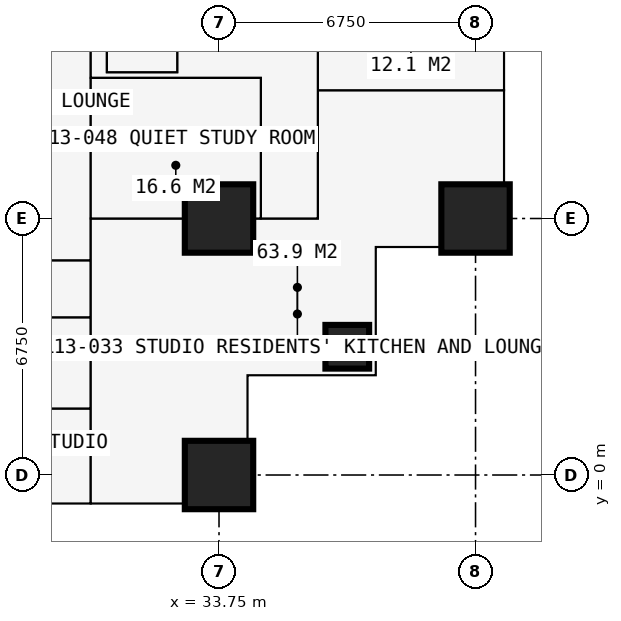
"""IFC4 building model, lengths in metres.
Left out: names, types, materials, properties, quantities, classifications, styles, units other than length and angle.
Written with IfcOpenShell. Run it as: python <this file> out.ifc"""

import sys

from ifc_helpers import new_model, si_unit, direction, frame, frame_2d, origin, origin_2d, place, context, subcontext, project, spatial, rectangle, extrude, element, fill, save


model = new_model("IFC4")
c1 = context("Model", 3, precision=1e-05, world=origin(), true_north=direction((0.0, 1.0)))
c2 = subcontext(c1, "Body", "Model", "MODEL_VIEW")
j1 = project(units=[si_unit("LENGTHUNIT", "METRE"), si_unit("PLANEANGLEUNIT", "RADIAN")], contexts=[c1])
p1 = place(None, origin())
s1 = spatial("IfcSite", under=j1, at=p1, CompositionType="ELEMENT")
p2 = place(p1, origin())
s2 = spatial("IfcBuilding", under=s1, at=p2, CompositionType="ELEMENT")
p3 = place(p2, frame((0.0, 0.0, 50.4)))
s3 = spatial("IfcBuildingStorey", under=s2, at=p3, CompositionType="ELEMENT", Elevation=50.4)
for number, where, z_axis, x_axis in (
    (1, (33.75, 0.0, 0.0), (0.0, 0.0, 1.0), (1.0, 0.0, 0.0)),
    (2, (33.75, 6.75, 0.0), (0.0, 0.0, 1.0), (1.0, 0.0, 0.0)),
):
    element("IfcColumn", number, at=place(p3, frame(where, z_axis=z_axis, x_axis=x_axis)), inside=s3, PredefinedType="COLUMN", context=c2, shape_type="SweptSolid", body=[
        extrude(rectangle(XDim=1.8, YDim=1.8, at=origin_2d()), origin(), (0.0, 0.0, 1.0), 3.6),
    ])
p4 = place(p3, frame((37.125, 3.375, 0.0), z_axis=(0.0, 0.0, 1.0), x_axis=(1.0, 0.0, 0.0)))
e3 = element("IfcColumn", 3, at=p4, inside=s3, PredefinedType="COLUMN", context=c2, shape_type="SweptSolid", body=[
    extrude(rectangle(XDim=1.15, YDim=1.15, at=origin_2d()), origin(), (0.0, 0.0, 1.0), 3.6),
])
p5 = place(p3, frame((40.5, 6.75, 0.0), z_axis=(0.0, 0.0, 1.0), x_axis=(1.0, 0.0, 0.0)))
e4 = element("IfcColumn", 4, at=p5, inside=s3, PredefinedType="COLUMN", context=c2, shape_type="SweptSolid", body=[
    extrude(rectangle(XDim=1.8, YDim=1.8, at=origin_2d()), origin(), (0.0, 0.0, 1.0), 3.6),
])
p6 = place(p3, frame((34.5, -0.75, 0.0), z_axis=(0.0, 0.0, 1.0), x_axis=(0.0, 1.0, 0.0)))
e5 = element("IfcWall", 5, at=p6, inside=s3, PredefinedType="SOLIDWALL", context=c2, shape_type="SweptSolid", body=[
    extrude(rectangle(XDim=3.375, YDim=0.3, at=frame_2d((1.688, 0.0))), origin(), (0.0, 0.0, 1.0), 3.375),
])
p7 = place(p6, frame((1.833, 0.0, 0.9)))
e6 = element("IfcOpeningElement", 6, at=p7, cuts=e5, PredefinedType="OPENING", context=c2, shape_type="SweptSolid", body=[
    extrude(rectangle(XDim=1.2, YDim=1.8, at=frame_2d((0.6, 0.9))), frame((0.0, 0.16, 0.0), z_axis=(0.0, -1.0, 0.0), x_axis=(1.0, 0.0, 0.0)), (0.0, 0.0, 1.0), 0.32),
])
p8 = place(p3, frame((34.5, 2.625, 0.0), z_axis=(0.0, 0.0, 1.0), x_axis=(1.0, 0.0, 0.0)))
e7 = element("IfcWall", 7, at=p8, inside=s3, PredefinedType="SOLIDWALL", context=c2, shape_type="SweptSolid", body=[
    extrude(rectangle(XDim=3.375, YDim=0.3, at=frame_2d((1.688, 0.0))), origin(), (0.0, 0.0, 1.0), 3.375),
])
p9 = place(p8, frame((0.788, 0.0, 0.6)))
e8 = element("IfcOpeningElement", 8, at=p9, cuts=e7, PredefinedType="OPENING", context=c2, shape_type="SweptSolid", body=[
    extrude(rectangle(XDim=1.8, YDim=2.1, at=frame_2d((0.9, 1.05))), frame((0.0, 0.16, 0.0), z_axis=(0.0, -1.0, 0.0), x_axis=(1.0, 0.0, 0.0)), (0.0, 0.0, 1.0), 0.32),
])
p10 = place(p3, frame((37.875, 2.625, 0.0), z_axis=(0.0, 0.0, 1.0), x_axis=(0.0, 1.0, 0.0)))
e9 = element("IfcWall", 9, at=p10, inside=s3, PredefinedType="SOLIDWALL", context=c2, shape_type="SweptSolid", body=[
    extrude(rectangle(XDim=3.375, YDim=0.3, at=frame_2d((1.688, 0.0))), origin(), (0.0, 0.0, 1.0), 3.375),
])
p11 = place(p10, frame((0.788, 0.0, 0.6)))
e10 = element("IfcOpeningElement", 10, at=p11, cuts=e9, PredefinedType="OPENING", context=c2, shape_type="SweptSolid", body=[
    extrude(rectangle(XDim=1.8, YDim=2.1, at=frame_2d((0.9, 1.05))), frame((0.0, 0.16, 0.0), z_axis=(0.0, -1.0, 0.0), x_axis=(1.0, 0.0, 0.0)), (0.0, 0.0, 1.0), 0.32),
])
p12 = place(p3, frame((37.875, 6.0, 0.0), z_axis=(0.0, 0.0, 1.0), x_axis=(1.0, 0.0, 0.0)))
e11 = element("IfcWall", 11, at=p12, inside=s3, PredefinedType="SOLIDWALL", context=c2, shape_type="SweptSolid", body=[
    extrude(rectangle(XDim=3.375, YDim=0.3, at=frame_2d((1.688, 0.0))), origin(), (0.0, 0.0, 1.0), 3.375),
])
p13 = place(p12, frame((0.343, 0.0, 0.9)))
e12 = element("IfcOpeningElement", 12, at=p13, cuts=e11, PredefinedType="OPENING", context=c2, shape_type="SweptSolid", body=[
    extrude(rectangle(XDim=1.2, YDim=1.8, at=frame_2d((0.6, 0.9))), frame((0.0, 0.16, 0.0), z_axis=(0.0, -1.0, 0.0), x_axis=(1.0, 0.0, 0.0)), (0.0, 0.0, 1.0), 0.32),
])
p14 = place(p3, frame((6.75, 4.15, 0.0), z_axis=(0.0, 0.0, 1.0), x_axis=(1.0, 0.0, 0.0)))
e13 = element("IfcWall", 13, at=p14, inside=s3, PredefinedType="PARTITIONING", context=c2, shape_type="SweptSolid", body=[
    extrude(rectangle(XDim=23.625, YDim=0.15, at=frame_2d((11.812, 0.0))), origin(), (0.0, 0.0, 1.0), 3.375),
])
p15 = place(p14, frame((0.2, 0.0, 0.0)))
e14 = element("IfcOpeningElement", 14, at=p15, cuts=e13, PredefinedType="OPENING", context=c2, shape_type="SweptSolid", body=[
    extrude(rectangle(XDim=0.95, YDim=2.2, at=frame_2d((0.475, 1.1))), frame((0.0, 0.085, 0.0), z_axis=(0.0, -1.0, 0.0), x_axis=(1.0, 0.0, 0.0)), (0.0, 0.0, 1.0), 0.17),
])
p16 = place(p14, frame((3.625, 0.0, 0.0)))
e15 = element("IfcOpeningElement", 15, at=p16, cuts=e13, PredefinedType="OPENING", context=c2, shape_type="SweptSolid", body=[
    extrude(rectangle(XDim=0.95, YDim=2.2, at=frame_2d((0.475, 1.1))), frame((0.0, 0.085, 0.0), z_axis=(0.0, -1.0, 0.0), x_axis=(1.0, 0.0, 0.0)), (0.0, 0.0, 1.0), 0.17),
])
p17 = place(p14, frame((18.475, 0.0, 0.0)))
e16 = element("IfcOpeningElement", 16, at=p17, cuts=e13, PredefinedType="OPENING", context=c2, shape_type="SweptSolid", body=[
    extrude(rectangle(XDim=0.95, YDim=2.2, at=frame_2d((0.475, 1.1))), frame((0.0, 0.085, 0.0), z_axis=(0.0, -1.0, 0.0), x_axis=(1.0, 0.0, 0.0)), (0.0, 0.0, 1.0), 0.17),
])
p18 = place(p14, frame((11.725, 0.0, 0.0)))
e17 = element("IfcOpeningElement", 17, at=p18, cuts=e13, PredefinedType="OPENING", context=c2, shape_type="SweptSolid", body=[
    extrude(rectangle(XDim=0.95, YDim=2.2, at=frame_2d((0.475, 1.1))), frame((0.0, 0.085, 0.0), z_axis=(0.0, -1.0, 0.0), x_axis=(1.0, 0.0, 0.0)), (0.0, 0.0, 1.0), 0.17),
])
p19 = place(p14, frame((6.95, 0.0, 0.0)))
e18 = element("IfcOpeningElement", 18, at=p19, cuts=e13, PredefinedType="OPENING", context=c2, shape_type="SweptSolid", body=[
    extrude(rectangle(XDim=0.95, YDim=2.2, at=frame_2d((0.475, 1.1))), frame((0.0, 0.085, 0.0), z_axis=(0.0, -1.0, 0.0), x_axis=(1.0, 0.0, 0.0)), (0.0, 0.0, 1.0), 0.17),
])
p20 = place(p3, frame((22.988, 5.65, 0.0), z_axis=(0.0, 0.0, 1.0), x_axis=(1.0, 0.0, 0.0)))
e19 = element("IfcWall", 19, at=p20, inside=s3, PredefinedType="PARTITIONING", context=c2, shape_type="SweptSolid", body=[
    extrude(rectangle(XDim=7.387, YDim=0.15, at=frame_2d((3.694, 0.0))), origin(), (0.0, 0.0, 1.0), 3.375),
])
p21 = place(p20, frame((2.15, 0.0, 0.0)))
e20 = element("IfcOpeningElement", 20, at=p21, cuts=e19, PredefinedType="OPENING", context=c2, shape_type="SweptSolid", body=[
    extrude(rectangle(XDim=0.95, YDim=2.2, at=frame_2d((0.475, 1.1))), frame((0.0, 0.085, 0.0), z_axis=(0.0, -1.0, 0.0), x_axis=(1.0, 0.0, 0.0)), (0.0, 0.0, 1.0), 0.17),
])
p22 = place(p3, frame((27.775, 1.75, 0.0), z_axis=(0.0, 0.0, 1.0), x_axis=(1.0, 0.0, 0.0)))
e21 = element("IfcWall", 21, at=p22, inside=s3, PredefinedType="PARTITIONING", context=c2, shape_type="SweptSolid", body=[
    extrude(rectangle(XDim=2.6, YDim=0.1, at=frame_2d((1.3, 0.0))), origin(), (0.0, 0.0, 1.0), 3.375),
])
p23 = place(p22, frame((0.85, 0.0, 0.0)))
e22 = element("IfcOpeningElement", 22, at=p23, cuts=e21, PredefinedType="OPENING", context=c2, shape_type="SweptSolid", body=[
    extrude(rectangle(XDim=0.9, YDim=2.2, at=frame_2d((0.45, 1.1))), frame((0.0, 0.06, 0.0), z_axis=(0.0, -1.0, 0.0), x_axis=(1.0, 0.0, 0.0)), (0.0, 0.0, 1.0), 0.12),
])
p24 = place(p3, frame((30.375, -0.734, 0.0), z_axis=(0.0, 0.0, 1.0), x_axis=(0.0, 1.0, 0.0)))
e23 = element("IfcWall", 23, at=p24, inside=s3, PredefinedType="PARTITIONING", context=c2, shape_type="SweptSolid", body=[
    extrude(rectangle(XDim=12.034, YDim=0.15, at=frame_2d((6.017, 0.0))), origin(), (0.0, 0.0, 1.0), 3.375),
])
p25 = place(p24, frame((5.134, 0.0, 0.0)))
e24 = element("IfcOpeningElement", 24, at=p25, cuts=e23, PredefinedType="OPENING", context=c2, shape_type="SweptSolid", body=[
    extrude(rectangle(XDim=1.0, YDim=2.2, at=frame_2d((0.5, 1.1))), frame((0.0, 0.085, 0.0), z_axis=(0.0, -1.0, 0.0), x_axis=(1.0, 0.0, 0.0)), (0.0, 0.0, 1.0), 0.17),
])
p26 = place(p3, frame((30.375, 6.75, 0.0), z_axis=(0.0, 0.0, 1.0), x_axis=(1.0, 0.0, 0.0)))
e25 = element("IfcWall", 25, at=p26, inside=s3, PredefinedType="PARTITIONING", context=c2, shape_type="SweptSolid", body=[
    extrude(rectangle(XDim=5.975, YDim=0.15, at=frame_2d((2.988, 0.0))), origin(), (0.0, 0.0, 1.0), 2.877),
])
p27 = place(p3, frame((30.375, 10.45, 0.0), z_axis=(0.0, 0.0, 1.0), x_axis=(1.0, 0.0, 0.0)))
e26 = element("IfcWall", 26, at=p27, inside=s3, PredefinedType="PARTITIONING", context=c2, shape_type="SweptSolid", body=[
    extrude(rectangle(XDim=4.475, YDim=0.15, at=frame_2d((2.238, 0.0))), origin(), (0.0, 0.0, 1.0), 3.375),
])
p28 = place(p27, frame((2.35, 0.0, 0.0)))
e27 = element("IfcOpeningElement", 27, at=p28, cuts=e26, PredefinedType="OPENING", context=c2, shape_type="SweptSolid", body=[
    extrude(rectangle(XDim=0.95, YDim=2.2, at=frame_2d((0.475, 1.1))), frame((0.0, 0.085, 0.0), z_axis=(0.0, -1.0, 0.0), x_axis=(1.0, 0.0, 0.0)), (0.0, 0.0, 1.0), 0.17),
])
p29 = place(p3, frame((30.8, 10.6, 0.0), z_axis=(0.0, 0.0, 1.0), x_axis=(0.0, 1.0, 0.0)))
e28 = element("IfcWall", 28, at=p29, inside=s3, PredefinedType="PARTITIONING", context=c2, shape_type="SweptSolid", body=[
    extrude(rectangle(XDim=0.7, YDim=0.15, at=frame_2d((0.35, 0.0))), origin(), (0.0, 0.0, 1.0), 3.375),
])
p30 = place(p3, frame((30.8, 10.6, 0.0), z_axis=(0.0, 0.0, 1.0), x_axis=(1.0, 0.0, 0.0)))
e29 = element("IfcWall", 29, at=p30, inside=s3, PredefinedType="PARTITIONING", context=c2, shape_type="SweptSolid", body=[
    extrude(rectangle(XDim=1.85, YDim=0.15, at=frame_2d((0.925, 0.0))), origin(), (0.0, 0.0, 1.0), 3.375),
])
p31 = place(p3, frame((32.65, 10.6, 0.0), z_axis=(0.0, 0.0, 1.0), x_axis=(0.0, 1.0, 0.0)))
e30 = element("IfcWall", 30, at=p31, inside=s3, PredefinedType="SHEAR", context=c2, shape_type="SweptSolid", body=[
    extrude(rectangle(XDim=9.3, YDim=0.1, at=frame_2d((4.65, 0.0))), origin(), (0.0, 0.0, 1.0), 3.375),
])
p32 = place(p31, frame((0.5, 0.0, 0.0)))
e31 = element("IfcOpeningElement", 31, at=p32, cuts=e30, PredefinedType="OPENING", context=c2, shape_type="SweptSolid", body=[
    extrude(rectangle(XDim=1.0, YDim=2.2, at=frame_2d((0.5, 1.1))), frame((0.0, 0.06, 0.0), z_axis=(0.0, -1.0, 0.0), x_axis=(1.0, 0.0, 0.0)), (0.0, 0.0, 1.0), 0.12),
])
p33 = place(p3, frame((34.85, 6.75, 0.0), z_axis=(0.0, 0.0, 1.0), x_axis=(0.0, 1.0, 0.0)))
e32 = element("IfcWall", 32, at=p33, inside=s3, PredefinedType="PARTITIONING", context=c2, shape_type="SweptSolid", body=[
    extrude(rectangle(XDim=3.7, YDim=0.15, at=frame_2d((1.85, 0.0))), origin(), (0.0, 0.0, 1.0), 3.375),
])
p34 = place(p3, frame((36.35, 6.75, 0.0), z_axis=(0.0, 0.0, 1.0), x_axis=(0.0, 1.0, 0.0)))
e33 = element("IfcWall", 33, at=p34, inside=s3, PredefinedType="PARTITIONING", context=c2, shape_type="SweptSolid", body=[
    extrude(rectangle(XDim=23.625, YDim=0.1, at=frame_2d((11.812, 0.0))), origin(), (0.0, 0.0, 1.0), 3.375),
])
p35 = place(p34, frame((3.575, 0.0, 0.0)))
e34 = element("IfcOpeningElement", 34, at=p35, cuts=e33, PredefinedType="OPENING", context=c2, shape_type="SweptSolid", body=[
    extrude(rectangle(XDim=0.95, YDim=2.2, at=frame_2d((0.475, 1.1))), frame((0.0, 0.06, 0.0), z_axis=(0.0, -1.0, 0.0), x_axis=(1.0, 0.0, 0.0)), (0.0, 0.0, 1.0), 0.12),
])
p36 = place(p34, frame((7.0, 0.0, 0.0)))
e35 = element("IfcOpeningElement", 35, at=p36, cuts=e33, PredefinedType="OPENING", context=c2, shape_type="SweptSolid", body=[
    extrude(rectangle(XDim=0.95, YDim=2.2, at=frame_2d((0.475, 1.1))), frame((0.0, 0.06, 0.0), z_axis=(0.0, -1.0, 0.0), x_axis=(1.0, 0.0, 0.0)), (0.0, 0.0, 1.0), 0.12),
])
p37 = place(p34, frame((10.375, 0.0, 0.0)))
e36 = element("IfcOpeningElement", 36, at=p37, cuts=e33, PredefinedType="OPENING", context=c2, shape_type="SweptSolid", body=[
    extrude(rectangle(XDim=0.95, YDim=2.2, at=frame_2d((0.475, 1.1))), frame((0.0, 0.06, 0.0), z_axis=(0.0, -1.0, 0.0), x_axis=(1.0, 0.0, 0.0)), (0.0, 0.0, 1.0), 0.12),
])
p38 = place(p34, frame((13.75, 0.0, 0.0)))
e37 = element("IfcOpeningElement", 37, at=p38, cuts=e33, PredefinedType="OPENING", context=c2, shape_type="SweptSolid", body=[
    extrude(rectangle(XDim=0.95, YDim=2.2, at=frame_2d((0.475, 1.1))), frame((0.0, 0.06, 0.0), z_axis=(0.0, -1.0, 0.0), x_axis=(1.0, 0.0, 0.0)), (0.0, 0.0, 1.0), 0.12),
])
p39 = place(p34, frame((17.125, 0.0, 0.0)))
e38 = element("IfcOpeningElement", 38, at=p39, cuts=e33, PredefinedType="OPENING", context=c2, shape_type="SweptSolid", body=[
    extrude(rectangle(XDim=0.95, YDim=2.2, at=frame_2d((0.475, 1.1))), frame((0.0, 0.06, 0.0), z_axis=(0.0, -1.0, 0.0), x_axis=(1.0, 0.0, 0.0)), (0.0, 0.0, 1.0), 0.12),
])
p40 = place(p34, frame((20.5, 0.0, 0.0)))
e39 = element("IfcOpeningElement", 39, at=p40, cuts=e33, PredefinedType="OPENING", context=c2, shape_type="SweptSolid", body=[
    extrude(rectangle(XDim=0.95, YDim=2.2, at=frame_2d((0.475, 1.1))), frame((0.0, 0.06, 0.0), z_axis=(0.0, -1.0, 0.0), x_axis=(1.0, 0.0, 0.0)), (0.0, 0.0, 1.0), 0.12),
])
p41 = place(p3, frame((36.35, 10.125, 0.0), z_axis=(0.0, 0.0, 1.0), x_axis=(1.0, 0.0, 0.0)))
e40 = element("IfcWall", 40, at=p41, inside=s3, PredefinedType="PARTITIONING", context=c2, shape_type="SweptSolid", body=[
    extrude(rectangle(XDim=4.884, YDim=0.15, at=frame_2d((2.442, 0.0))), origin(), (0.0, 0.0, 1.0), 3.375),
])
p42 = place(p7, origin())
e41 = element("IfcWindow", 41, at=p42, inside=s3, PartitioningType="SINGLE_PANEL", PredefinedType="WINDOW", context=c2, shape_type="SweptSolid", body=[
    extrude(rectangle(XDim=1.2, YDim=1.8, at=frame_2d((0.6, 0.9))), frame((0.0, 0.03, 0.0), z_axis=(0.0, -1.0, 0.0), x_axis=(1.0, 0.0, 0.0)), (0.0, 0.0, 1.0), 0.06),
])
fill(e6, e41)
p43 = place(p9, origin())
e42 = element("IfcWindow", 42, at=p43, inside=s3, PartitioningType="SINGLE_PANEL", PredefinedType="WINDOW", context=c2, shape_type="SweptSolid", body=[
    extrude(rectangle(XDim=1.8, YDim=2.1, at=frame_2d((0.9, 1.05))), frame((0.0, 0.03, 0.0), z_axis=(0.0, -1.0, 0.0), x_axis=(1.0, 0.0, 0.0)), (0.0, 0.0, 1.0), 0.06),
])
fill(e8, e42)
p44 = place(p11, origin())
e43 = element("IfcWindow", 43, at=p44, inside=s3, PartitioningType="SINGLE_PANEL", PredefinedType="WINDOW", context=c2, shape_type="SweptSolid", body=[
    extrude(rectangle(XDim=1.8, YDim=2.1, at=frame_2d((0.9, 1.05))), frame((0.0, 0.03, 0.0), z_axis=(0.0, -1.0, 0.0), x_axis=(1.0, 0.0, 0.0)), (0.0, 0.0, 1.0), 0.06),
])
fill(e10, e43)
p45 = place(p13, origin())
e44 = element("IfcWindow", 44, at=p45, inside=s3, PartitioningType="SINGLE_PANEL", PredefinedType="WINDOW", context=c2, shape_type="SweptSolid", body=[
    extrude(rectangle(XDim=1.2, YDim=1.8, at=frame_2d((0.6, 0.9))), frame((0.0, 0.03, 0.0), z_axis=(0.0, -1.0, 0.0), x_axis=(1.0, 0.0, 0.0)), (0.0, 0.0, 1.0), 0.06),
])
fill(e12, e44)
p46 = place(p23, origin())
e45 = element("IfcDoor", 45, at=p46, inside=s3, OperationType="SINGLE_SWING_RIGHT", PredefinedType="DOOR", context=c2, shape_type="SweptSolid", body=[
    extrude(rectangle(XDim=0.9, YDim=2.2, at=frame_2d((0.45, 1.1))), frame((0.0, 0.025, 0.0), z_axis=(0.0, -1.0, 0.0), x_axis=(1.0, 0.0, 0.0)), (0.0, 0.0, 1.0), 0.05),
])
fill(e22, e45)
p47 = place(p25, origin())
e46 = element("IfcDoor", 46, at=p47, inside=s3, OperationType="SINGLE_SWING_LEFT", PredefinedType="DOOR", context=c2, shape_type="SweptSolid", body=[
    extrude(rectangle(XDim=1.0, YDim=2.2, at=frame_2d((0.5, 1.1))), frame((0.0, 0.025, 0.0), z_axis=(0.0, -1.0, 0.0), x_axis=(1.0, 0.0, 0.0)), (0.0, 0.0, 1.0), 0.05),
])
fill(e24, e46)
p48 = place(p35, origin())
e47 = element("IfcDoor", 47, at=p48, inside=s3, OperationType="SINGLE_SWING_LEFT", PredefinedType="DOOR", context=c2, shape_type="SweptSolid", body=[
    extrude(rectangle(XDim=0.95, YDim=2.2, at=frame_2d((0.475, 1.1))), frame((0.0, 0.025, 0.0), z_axis=(0.0, -1.0, 0.0), x_axis=(1.0, 0.0, 0.0)), (0.0, 0.0, 1.0), 0.05),
])
fill(e34, e47)
p49 = place(p32, origin())
e48 = element("IfcDoor", 48, at=p49, inside=s3, OperationType="SINGLE_SWING_LEFT", PredefinedType="DOOR", context=c2, shape_type="SweptSolid", body=[
    extrude(rectangle(XDim=1.0, YDim=2.2, at=frame_2d((0.5, 1.1))), frame((0.0, 0.025, 0.0), z_axis=(0.0, -1.0, 0.0), x_axis=(1.0, 0.0, 0.0)), (0.0, 0.0, 1.0), 0.05),
])
fill(e31, e48)
p50 = place(p28, origin())
e49 = element("IfcDoor", 49, at=p50, inside=s3, OperationType="SINGLE_SWING_LEFT", PredefinedType="DOOR", context=c2, shape_type="SweptSolid", body=[
    extrude(rectangle(XDim=0.95, YDim=2.2, at=frame_2d((0.475, 1.1))), frame((0.0, 0.025, 0.0), z_axis=(0.0, -1.0, 0.0), x_axis=(1.0, 0.0, 0.0)), (0.0, 0.0, 1.0), 0.05),
])
fill(e27, e49)
save(model, sys.argv[1])
